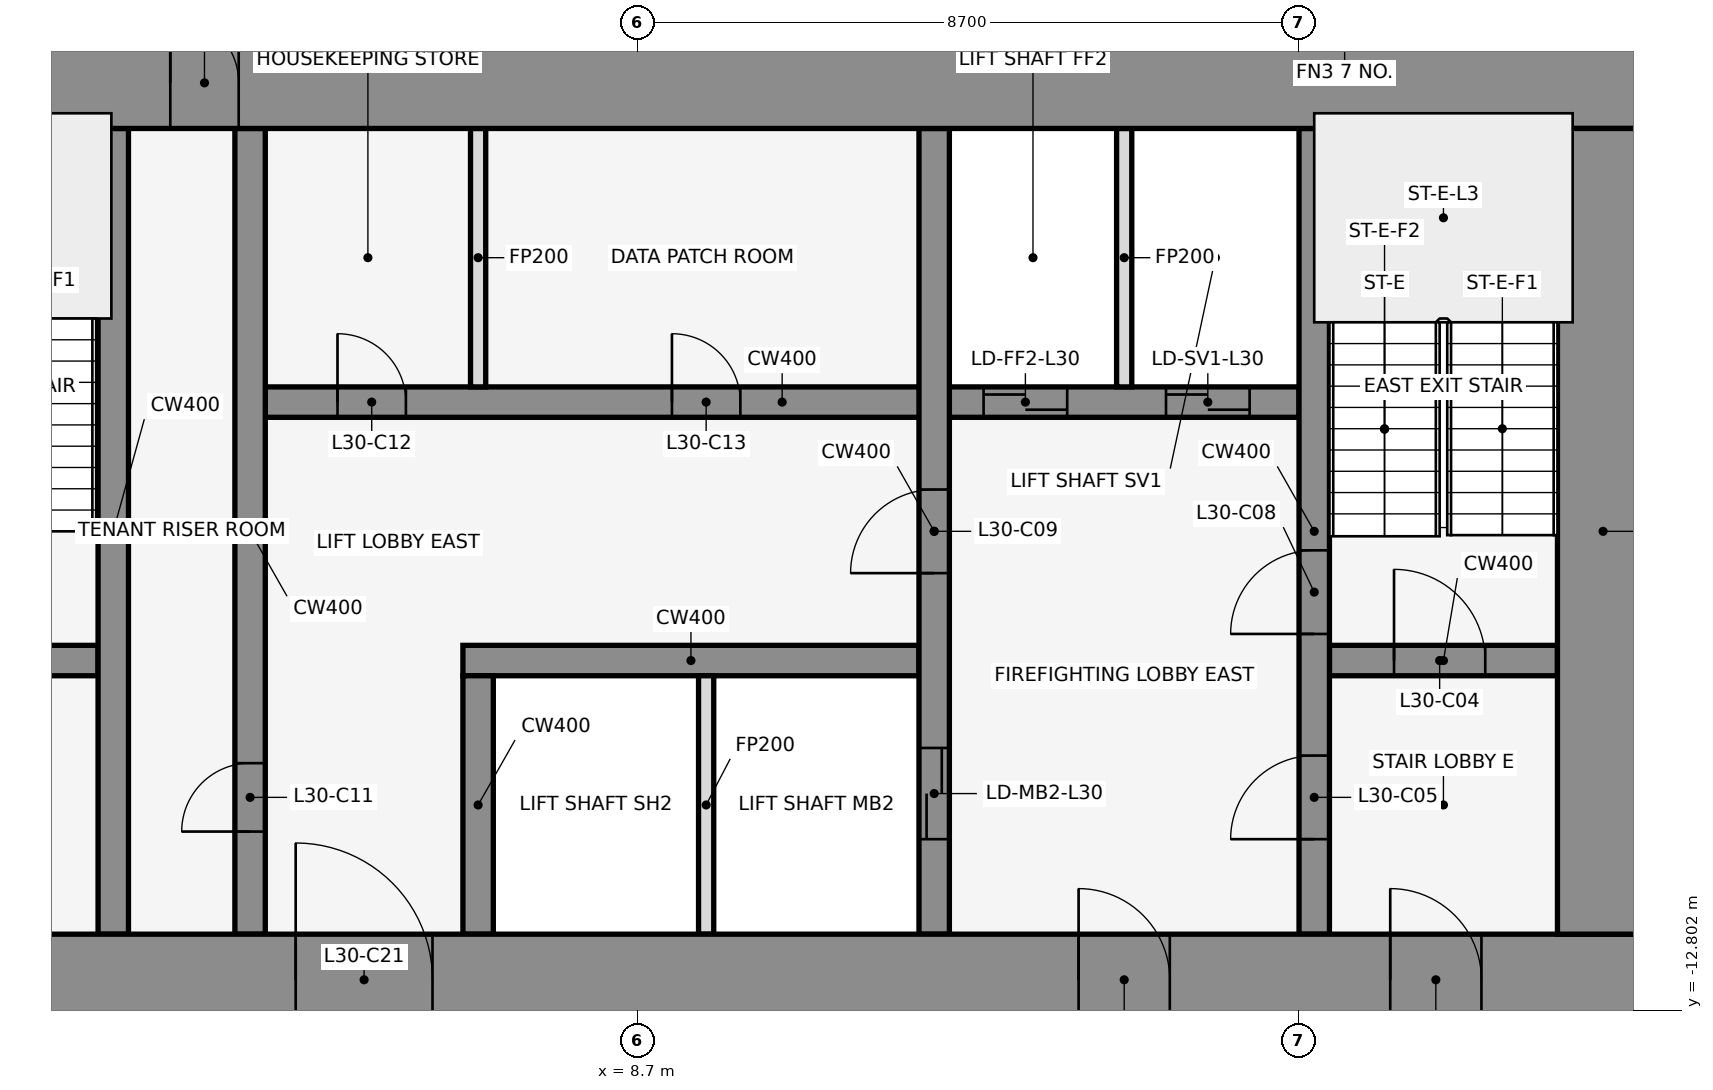
"""IFC4 building model, lengths in metres.
Left out: names, types, materials, properties, quantities, classifications, styles, units other than length and angle.
Written with IfcOpenShell. Run it as: python <this file> out.ifc"""

import sys

from ifc_helpers import new_model, si_unit, direction, frame, frame_2d, origin, place, context, subcontext, project, spatial, rectangle, extrude, element, fill, save


model = new_model("IFC4")
c1 = context("Model", 3, precision=1e-05, world=origin(), true_north=direction((0.0, 1.0)))
c2 = subcontext(c1, "Body", "Model", "MODEL_VIEW")
j1 = project(units=[si_unit("LENGTHUNIT", "METRE"), si_unit("PLANEANGLEUNIT", "RADIAN")], contexts=[c1])
p1 = place(None, origin())
s1 = spatial("IfcSite", under=j1, at=p1, CompositionType="ELEMENT")
p2 = place(p1, origin())
s2 = spatial("IfcBuilding", under=s1, at=p2, CompositionType="ELEMENT")
p3 = place(p2, frame((0.0, 0.0, 140.4)))
s3 = spatial("IfcBuildingStorey", under=s2, at=p3, CompositionType="ELEMENT", Elevation=140.4)
for number, where, z_axis, x_axis in (
    (1, (16.432, -0.105, 0.0), (0.0, 0.0, 1.0), (-0.84, 0.543, 0.0)),
    (2, (1.901, 1.08, 0.0), (0.0, 0.0, 1.0), (-0.84, -0.543, 0.0)),
):
    element("IfcWall", number, at=place(p3, frame(where, z_axis=z_axis, x_axis=x_axis)), inside=s3, PredefinedType="STANDARD", context=c2, shape_type="SweptSolid", body=[
        extrude(rectangle(XDim=2.183, YDim=0.25, at=frame_2d((1.091, 0.0))), origin(), (0.0, 0.0, 1.0), 3.95),
    ])
p4 = place(p3, frame((-1.6, -8.2, 0.0), z_axis=(0.0, 0.0, 1.0), x_axis=(1.0, 0.0, 0.0)))
e3 = element("IfcWall", 3, at=p4, inside=s3, PredefinedType="SHEAR", context=c2, shape_type="SweptSolid", body=[
    extrude(rectangle(XDim=3.2, YDim=0.4, at=frame_2d((1.6, 0.0))), origin(), (0.0, 0.0, 1.0), 4.1),
])
p5 = place(p4, frame((1.05, 0.0, 0.0)))
e4 = element("IfcOpeningElement", 4, at=p5, cuts=e3, PredefinedType="OPENING", context=c2, shape_type="SweptSolid", body=[
    extrude(rectangle(XDim=1.2, YDim=2.1, at=frame_2d((0.6, 1.05))), frame((0.0, 0.212, 0.0), z_axis=(0.0, -1.0, 0.0), x_axis=(1.0, 0.0, 0.0)), (0.0, 0.0, 1.0), 0.424),
])
p6 = place(p3, frame((6.4, -8.2, 0.0), z_axis=(0.0, 0.0, 1.0), x_axis=(1.0, 0.0, 0.0)))
e5 = element("IfcWall", 5, at=p6, inside=s3, PredefinedType="SHEAR", context=c2, shape_type="SweptSolid", body=[
    extrude(rectangle(XDim=6.0, YDim=0.4, at=frame_2d((3.0, 0.0))), origin(), (0.0, 0.0, 1.0), 4.1),
])
p7 = place(p3, frame((17.8, -8.2, 0.0), z_axis=(0.0, 0.0, 1.0), x_axis=(1.0, 0.0, 0.0)))
e6 = element("IfcWall", 6, at=p7, inside=s3, PredefinedType="SHEAR", context=c2, shape_type="SweptSolid", body=[
    extrude(rectangle(XDim=3.0, YDim=0.4, at=frame_2d((1.5, 0.0))), origin(), (0.0, 0.0, 1.0), 4.1),
])
p8 = place(p7, frame((0.85, 0.0, 0.0)))
e7 = element("IfcOpeningElement", 7, at=p8, cuts=e6, PredefinedType="OPENING", context=c2, shape_type="SweptSolid", body=[
    extrude(rectangle(XDim=1.2, YDim=2.1, at=frame_2d((0.6, 1.05))), frame((0.0, 0.212, 0.0), z_axis=(0.0, -1.0, 0.0), x_axis=(1.0, 0.0, 0.0)), (0.0, 0.0, 1.0), 0.424),
])
p9 = place(p3, frame((3.8, -4.8, 0.0), z_axis=(0.0, 0.0, 1.0), x_axis=(1.0, 0.0, 0.0)))
e8 = element("IfcWall", 8, at=p9, inside=s3, PredefinedType="SHEAR", context=c2, shape_type="SweptSolid", body=[
    extrude(rectangle(XDim=13.6, YDim=0.4, at=frame_2d((6.8, 0.0))), origin(), (0.0, 0.0, 1.0), 4.1),
])
p10 = place(p9, frame((9.45, 0.0, 0.0)))
e9 = element("IfcOpeningElement", 9, at=p10, cuts=e8, PredefinedType="OPENING", context=c2, shape_type="SweptSolid", body=[
    extrude(rectangle(XDim=1.1, YDim=2.1, at=frame_2d((0.55, 1.05))), frame((0.0, 0.212, 0.0), z_axis=(0.0, -1.0, 0.0), x_axis=(1.0, 0.0, 0.0)), (0.0, 0.0, 1.0), 0.424),
])
p11 = place(p9, frame((11.85, 0.0, 0.0)))
e10 = element("IfcOpeningElement", 10, at=p11, cuts=e8, PredefinedType="OPENING", context=c2, shape_type="SweptSolid", body=[
    extrude(rectangle(XDim=1.1, YDim=2.1, at=frame_2d((0.55, 1.05))), frame((0.0, 0.212, 0.0), z_axis=(0.0, -1.0, 0.0), x_axis=(1.0, 0.0, 0.0)), (0.0, 0.0, 1.0), 0.424),
])
p12 = place(p9, frame((0.95, 0.0, 0.0)))
e11 = element("IfcOpeningElement", 11, at=p12, cuts=e8, PredefinedType="OPENING", context=c2, shape_type="SweptSolid", body=[
    extrude(rectangle(XDim=0.9, YDim=2.1, at=frame_2d((0.45, 1.05))), frame((0.0, 0.212, 0.0), z_axis=(0.0, -1.0, 0.0), x_axis=(1.0, 0.0, 0.0)), (0.0, 0.0, 1.0), 0.424),
])
p13 = place(p9, frame((5.35, 0.0, 0.0)))
e12 = element("IfcOpeningElement", 12, at=p13, cuts=e8, PredefinedType="OPENING", context=c2, shape_type="SweptSolid", body=[
    extrude(rectangle(XDim=0.9, YDim=2.1, at=frame_2d((0.45, 1.05))), frame((0.0, 0.212, 0.0), z_axis=(0.0, -1.0, 0.0), x_axis=(1.0, 0.0, 0.0)), (0.0, 0.0, 1.0), 0.424),
])
p14 = place(p3, frame((1.8, -11.8, 0.0), z_axis=(0.0, 0.0, 1.0), x_axis=(0.0, 1.0, 0.0)))
e13 = element("IfcWall", 13, at=p14, inside=s3, PredefinedType="SHEAR", context=c2, shape_type="SweptSolid", body=[
    extrude(rectangle(XDim=10.6, YDim=0.4, at=frame_2d((5.3, 0.0))), origin(), (0.0, 0.0, 1.0), 4.1),
])
p15 = place(p3, frame((3.6, -11.8, 0.0), z_axis=(0.0, 0.0, 1.0), x_axis=(0.0, 1.0, 0.0)))
e14 = element("IfcWall", 14, at=p15, inside=s3, PredefinedType="SHEAR", context=c2, shape_type="SweptSolid", body=[
    extrude(rectangle(XDim=10.6, YDim=0.4, at=frame_2d((5.3, 0.0))), origin(), (0.0, 0.0, 1.0), 4.1),
])
p16 = place(p15, frame((1.35, 0.0, 0.0)))
e15 = element("IfcOpeningElement", 15, at=p16, cuts=e14, PredefinedType="OPENING", context=c2, shape_type="SweptSolid", body=[
    extrude(rectangle(XDim=0.9, YDim=2.1, at=frame_2d((0.45, 1.05))), frame((0.0, 0.212, 0.0), z_axis=(0.0, -1.0, 0.0), x_axis=(1.0, 0.0, 0.0)), (0.0, 0.0, 1.0), 0.424),
])
p17 = place(p3, frame((6.6, -11.8, 0.0), z_axis=(0.0, 0.0, 1.0), x_axis=(0.0, 1.0, 0.0)))
e16 = element("IfcWall", 16, at=p17, inside=s3, PredefinedType="SHEAR", context=c2, shape_type="SweptSolid", body=[
    extrude(rectangle(XDim=3.4, YDim=0.4, at=frame_2d((1.7, 0.0))), origin(), (0.0, 0.0, 1.0), 4.1),
])
for number, where, z_axis, x_axis in (
    (17, (6.6, -4.6, 0.0), (0.0, 0.0, 1.0), (0.0, 1.0, 0.0)),
    (18, (9.6, -11.8, 0.0), (0.0, 0.0, 1.0), (0.0, 1.0, 0.0)),
):
    element("IfcWall", number, at=place(p3, frame(where, z_axis=z_axis, x_axis=x_axis)), inside=s3, PredefinedType="PARTITIONING", context=c2, shape_type="SweptSolid", body=[
        extrude(rectangle(XDim=3.4, YDim=0.2, at=frame_2d((1.7, 0.0))), origin(), (0.0, 0.0, 1.0), 2.939),
    ])
p18 = place(p3, frame((12.6, -11.8, 0.0), z_axis=(0.0, 0.0, 1.0), x_axis=(0.0, 1.0, 0.0)))
e19 = element("IfcWall", 19, at=p18, inside=s3, PredefinedType="SHEAR", context=c2, shape_type="SweptSolid", body=[
    extrude(rectangle(XDim=10.6, YDim=0.4, at=frame_2d((5.3, 0.0))), origin(), (0.0, 0.0, 1.0), 4.1),
])
p19 = place(p18, frame((1.25, 0.0, 0.0)))
e20 = element("IfcOpeningElement", 20, at=p19, cuts=e19, PredefinedType="OPENING", context=c2, shape_type="SweptSolid", body=[
    extrude(rectangle(XDim=1.2, YDim=2.1, at=frame_2d((0.6, 1.05))), frame((0.0, 0.212, 0.0), z_axis=(0.0, -1.0, 0.0), x_axis=(1.0, 0.0, 0.0)), (0.0, 0.0, 1.0), 0.424),
])
p20 = place(p18, frame((4.75, 0.0, 0.0)))
e21 = element("IfcOpeningElement", 21, at=p20, cuts=e19, PredefinedType="OPENING", context=c2, shape_type="SweptSolid", body=[
    extrude(rectangle(XDim=1.1, YDim=2.1, at=frame_2d((0.55, 1.05))), frame((0.0, 0.212, 0.0), z_axis=(0.0, -1.0, 0.0), x_axis=(1.0, 0.0, 0.0)), (0.0, 0.0, 1.0), 0.424),
])
p21 = place(p3, frame((15.1, -4.6, 0.0), z_axis=(0.0, 0.0, 1.0), x_axis=(0.0, 1.0, 0.0)))
e22 = element("IfcWall", 22, at=p21, inside=s3, PredefinedType="PARTITIONING", context=c2, shape_type="SweptSolid", body=[
    extrude(rectangle(XDim=3.4, YDim=0.2, at=frame_2d((1.7, 0.0))), origin(), (0.0, 0.0, 1.0), 2.939),
])
p22 = place(p3, frame((17.6, -11.8, 0.0), z_axis=(0.0, 0.0, 1.0), x_axis=(0.0, 1.0, 0.0)))
e23 = element("IfcWall", 23, at=p22, inside=s3, PredefinedType="SHEAR", context=c2, shape_type="SweptSolid", body=[
    extrude(rectangle(XDim=10.6, YDim=0.4, at=frame_2d((5.3, 0.0))), origin(), (0.0, 0.0, 1.0), 4.1),
])
p23 = place(p22, frame((1.25, 0.0, 0.0)))
e24 = element("IfcOpeningElement", 24, at=p23, cuts=e23, PredefinedType="OPENING", context=c2, shape_type="SweptSolid", body=[
    extrude(rectangle(XDim=1.1, YDim=2.1, at=frame_2d((0.55, 1.05))), frame((0.0, 0.212, 0.0), z_axis=(0.0, -1.0, 0.0), x_axis=(1.0, 0.0, 0.0)), (0.0, 0.0, 1.0), 0.424),
])
p24 = place(p22, frame((3.95, 0.0, 0.0)))
e25 = element("IfcOpeningElement", 25, at=p24, cuts=e23, PredefinedType="OPENING", context=c2, shape_type="SweptSolid", body=[
    extrude(rectangle(XDim=1.1, YDim=2.1, at=frame_2d((0.55, 1.05))), frame((0.0, 0.212, 0.0), z_axis=(0.0, -1.0, 0.0), x_axis=(1.0, 0.0, 0.0)), (0.0, 0.0, 1.0), 0.424),
])
p25 = place(p3, frame((-22.0, -0.6, 0.0), z_axis=(0.0, 0.0, 1.0), x_axis=(1.0, 0.0, 0.0)))
e26 = element("IfcWall", 26, at=p25, inside=s3, PredefinedType="SHEAR", context=c2, shape_type="SweptSolid", body=[
    extrude(rectangle(XDim=44.0, YDim=1.2, at=frame_2d((22.0, 0.0))), origin(), (0.0, 0.0, 1.0), 4.1),
])
p26 = place(p25, frame((18.55, 0.0, 0.0)))
e27 = element("IfcOpeningElement", 27, at=p26, cuts=e26, PredefinedType="OPENING", context=c2, shape_type="SweptSolid", body=[
    extrude(rectangle(XDim=0.9, YDim=2.1, at=frame_2d((0.45, 1.05))), frame((0.0, 0.612, 0.0), z_axis=(0.0, -1.0, 0.0), x_axis=(1.0, 0.0, 0.0)), (0.0, 0.0, 1.0), 1.224),
])
p27 = place(p25, frame((24.55, 0.0, 0.0)))
e28 = element("IfcOpeningElement", 28, at=p27, cuts=e26, PredefinedType="OPENING", context=c2, shape_type="SweptSolid", body=[
    extrude(rectangle(XDim=0.9, YDim=2.1, at=frame_2d((0.45, 1.05))), frame((0.0, 0.612, 0.0), z_axis=(0.0, -1.0, 0.0), x_axis=(1.0, 0.0, 0.0)), (0.0, 0.0, 1.0), 1.224),
])
p28 = place(p3, frame((-22.0, -12.4, 0.0), z_axis=(0.0, 0.0, 1.0), x_axis=(1.0, 0.0, 0.0)))
e29 = element("IfcWall", 29, at=p28, inside=s3, PredefinedType="SHEAR", context=c2, shape_type="SweptSolid", body=[
    extrude(rectangle(XDim=44.0, YDim=1.2, at=frame_2d((22.0, 0.0))), origin(), (0.0, 0.0, 1.0), 4.1),
])
p29 = place(p28, frame((2.2, 0.0, 0.0)))
e30 = element("IfcOpeningElement", 30, at=p29, cuts=e29, PredefinedType="OPENING", context=c2, shape_type="SweptSolid", body=[
    extrude(rectangle(XDim=1.2, YDim=2.1, at=frame_2d((0.6, 1.05))), frame((0.0, 0.612, 0.0), z_axis=(0.0, -1.0, 0.0), x_axis=(1.0, 0.0, 0.0)), (0.0, 0.0, 1.0), 1.224),
])
p30 = place(p28, frame((21.4, 0.0, 0.0)))
e31 = element("IfcOpeningElement", 31, at=p30, cuts=e29, PredefinedType="OPENING", context=c2, shape_type="SweptSolid", body=[
    extrude(rectangle(XDim=1.2, YDim=2.1, at=frame_2d((0.6, 1.05))), frame((0.0, 0.612, 0.0), z_axis=(0.0, -1.0, 0.0), x_axis=(1.0, 0.0, 0.0)), (0.0, 0.0, 1.0), 1.224),
])
p31 = place(p28, frame((40.6, 0.0, 0.0)))
e32 = element("IfcOpeningElement", 32, at=p31, cuts=e29, PredefinedType="OPENING", context=c2, shape_type="SweptSolid", body=[
    extrude(rectangle(XDim=1.2, YDim=2.1, at=frame_2d((0.6, 1.05))), frame((0.0, 0.612, 0.0), z_axis=(0.0, -1.0, 0.0), x_axis=(1.0, 0.0, 0.0)), (0.0, 0.0, 1.0), 1.224),
])
p32 = place(p28, frame((16.0, 0.0, 0.0)))
e33 = element("IfcOpeningElement", 33, at=p32, cuts=e29, PredefinedType="OPENING", context=c2, shape_type="SweptSolid", body=[
    extrude(rectangle(XDim=1.8, YDim=2.1, at=frame_2d((0.9, 1.05))), frame((0.0, 0.612, 0.0), z_axis=(0.0, -1.0, 0.0), x_axis=(1.0, 0.0, 0.0)), (0.0, 0.0, 1.0), 1.224),
])
p33 = place(p28, frame((6.3, 0.0, 0.0)))
e34 = element("IfcOpeningElement", 34, at=p33, cuts=e29, PredefinedType="OPENING", context=c2, shape_type="SweptSolid", body=[
    extrude(rectangle(XDim=1.2, YDim=2.1, at=frame_2d((0.6, 1.05))), frame((0.0, 0.612, 0.0), z_axis=(0.0, -1.0, 0.0), x_axis=(1.0, 0.0, 0.0)), (0.0, 0.0, 1.0), 1.224),
])
p34 = place(p28, frame((26.2, 0.0, 0.0)))
e35 = element("IfcOpeningElement", 35, at=p34, cuts=e29, PredefinedType="OPENING", context=c2, shape_type="SweptSolid", body=[
    extrude(rectangle(XDim=1.8, YDim=2.1, at=frame_2d((0.9, 1.05))), frame((0.0, 0.612, 0.0), z_axis=(0.0, -1.0, 0.0), x_axis=(1.0, 0.0, 0.0)), (0.0, 0.0, 1.0), 1.224),
])
p35 = place(p28, frame((36.5, 0.0, 0.0)))
e36 = element("IfcOpeningElement", 36, at=p35, cuts=e29, PredefinedType="OPENING", context=c2, shape_type="SweptSolid", body=[
    extrude(rectangle(XDim=1.2, YDim=2.1, at=frame_2d((0.6, 1.05))), frame((0.0, 0.612, 0.0), z_axis=(0.0, -1.0, 0.0), x_axis=(1.0, 0.0, 0.0)), (0.0, 0.0, 1.0), 1.224),
])
p36 = place(p3, frame((21.4, -11.8, 0.0), z_axis=(0.0, 0.0, 1.0), x_axis=(0.0, 1.0, 0.0)))
e37 = element("IfcWall", 37, at=p36, inside=s3, PredefinedType="SHEAR", context=c2, shape_type="SweptSolid", body=[
    extrude(rectangle(XDim=10.6, YDim=1.2, at=frame_2d((5.3, 0.0))), origin(), (0.0, 0.0, 1.0), 4.1),
])
p37 = place(p8, origin())
e38 = element("IfcDoor", 38, at=p37, inside=s3, OperationType="SINGLE_SWING_RIGHT", PredefinedType="DOOR", context=c2, shape_type="SweptSolid", body=[
    extrude(rectangle(XDim=1.2, YDim=2.1, at=frame_2d((0.6, 1.05))), frame((0.0, 0.025, 0.0), z_axis=(0.0, -1.0, 0.0), x_axis=(1.0, 0.0, 0.0)), (0.0, 0.0, 1.0), 0.05),
])
fill(e7, e38)
p38 = place(p23, origin())
e39 = element("IfcDoor", 39, at=p38, inside=s3, OperationType="SINGLE_SWING_LEFT", PredefinedType="DOOR", context=c2, shape_type="SweptSolid", body=[
    extrude(rectangle(XDim=1.1, YDim=2.1, at=frame_2d((0.55, 1.05))), frame((0.0, 0.025, 0.0), z_axis=(0.0, -1.0, 0.0), x_axis=(1.0, 0.0, 0.0)), (0.0, 0.0, 1.0), 0.05),
])
fill(e24, e39)
p39 = place(p19, origin())
e40 = element("IfcDoor", 40, at=p39, inside=s3, OperationType="DOUBLE_DOOR_SLIDING", PredefinedType="DOOR", context=c2, shape_type="SweptSolid", body=[
    extrude(rectangle(XDim=1.2, YDim=2.1, at=frame_2d((0.6, 1.05))), frame((0.0, 0.025, 0.0), z_axis=(0.0, -1.0, 0.0), x_axis=(1.0, 0.0, 0.0)), (0.0, 0.0, 1.0), 0.05),
])
fill(e20, e40)
p40 = place(p10, origin())
e41 = element("IfcDoor", 41, at=p40, inside=s3, OperationType="DOUBLE_DOOR_SLIDING", PredefinedType="DOOR", context=c2, shape_type="SweptSolid", body=[
    extrude(rectangle(XDim=1.1, YDim=2.1, at=frame_2d((0.55, 1.05))), frame((0.0, 0.025, 0.0), z_axis=(0.0, -1.0, 0.0), x_axis=(1.0, 0.0, 0.0)), (0.0, 0.0, 1.0), 0.05),
])
fill(e9, e41)
p41 = place(p11, origin())
e42 = element("IfcDoor", 42, at=p41, inside=s3, OperationType="DOUBLE_DOOR_SLIDING", PredefinedType="DOOR", context=c2, shape_type="SweptSolid", body=[
    extrude(rectangle(XDim=1.1, YDim=2.1, at=frame_2d((0.55, 1.05))), frame((0.0, 0.025, 0.0), z_axis=(0.0, -1.0, 0.0), x_axis=(1.0, 0.0, 0.0)), (0.0, 0.0, 1.0), 0.05),
])
fill(e10, e42)
p42 = place(p24, origin())
e43 = element("IfcDoor", 43, at=p42, inside=s3, OperationType="SINGLE_SWING_RIGHT", PredefinedType="DOOR", context=c2, shape_type="SweptSolid", body=[
    extrude(rectangle(XDim=1.1, YDim=2.1, at=frame_2d((0.55, 1.05))), frame((0.0, 0.025, 0.0), z_axis=(0.0, -1.0, 0.0), x_axis=(1.0, 0.0, 0.0)), (0.0, 0.0, 1.0), 0.05),
])
fill(e25, e43)
p43 = place(p20, frame((1.1, 0.0, 0.0), z_axis=(0.0, 0.0, 1.0), x_axis=(-1.0, 0.0, 0.0)))
e44 = element("IfcDoor", 44, at=p43, inside=s3, OperationType="SINGLE_SWING_RIGHT", PredefinedType="DOOR", context=c2, shape_type="SweptSolid", body=[
    extrude(rectangle(XDim=1.1, YDim=2.1, at=frame_2d((0.55, 1.05))), frame((0.0, 0.025, 0.0), z_axis=(0.0, -1.0, 0.0), x_axis=(1.0, 0.0, 0.0)), (0.0, 0.0, 1.0), 0.05),
])
fill(e21, e44)
p44 = place(p16, origin())
e45 = element("IfcDoor", 45, at=p44, inside=s3, OperationType="SINGLE_SWING_LEFT", PredefinedType="DOOR", context=c2, shape_type="SweptSolid", body=[
    extrude(rectangle(XDim=0.9, YDim=2.1, at=frame_2d((0.45, 1.05))), frame((0.0, 0.025, 0.0), z_axis=(0.0, -1.0, 0.0), x_axis=(1.0, 0.0, 0.0)), (0.0, 0.0, 1.0), 0.05),
])
fill(e15, e45)
p45 = place(p12, origin())
e46 = element("IfcDoor", 46, at=p45, inside=s3, OperationType="SINGLE_SWING_RIGHT", PredefinedType="DOOR", context=c2, shape_type="SweptSolid", body=[
    extrude(rectangle(XDim=0.9, YDim=2.1, at=frame_2d((0.45, 1.05))), frame((0.0, 0.025, 0.0), z_axis=(0.0, -1.0, 0.0), x_axis=(1.0, 0.0, 0.0)), (0.0, 0.0, 1.0), 0.05),
])
fill(e11, e46)
p46 = place(p13, origin())
e47 = element("IfcDoor", 47, at=p46, inside=s3, OperationType="SINGLE_SWING_LEFT", PredefinedType="DOOR", context=c2, shape_type="SweptSolid", body=[
    extrude(rectangle(XDim=0.9, YDim=2.1, at=frame_2d((0.45, 1.05))), frame((0.0, 0.025, 0.0), z_axis=(0.0, -1.0, 0.0), x_axis=(1.0, 0.0, 0.0)), (0.0, 0.0, 1.0), 0.05),
])
fill(e12, e47)
p47 = place(p27, origin())
e48 = element("IfcDoor", 48, at=p47, inside=s3, OperationType="SINGLE_SWING_LEFT", PredefinedType="DOOR", context=c2, shape_type="SweptSolid", body=[
    extrude(rectangle(XDim=0.9, YDim=2.1, at=frame_2d((0.45, 1.05))), frame((0.0, 0.025, 0.0), z_axis=(0.0, -1.0, 0.0), x_axis=(1.0, 0.0, 0.0)), (0.0, 0.0, 1.0), 0.05),
])
fill(e28, e48)
p48 = place(p31, frame((1.2, 0.0, 0.0), z_axis=(0.0, 0.0, 1.0), x_axis=(-1.0, 0.0, 0.0)))
e49 = element("IfcDoor", 49, at=p48, inside=s3, OperationType="SINGLE_SWING_RIGHT", PredefinedType="DOOR", context=c2, shape_type="SweptSolid", body=[
    extrude(rectangle(XDim=1.2, YDim=2.1, at=frame_2d((0.6, 1.05))), frame((0.0, 0.025, 0.0), z_axis=(0.0, -1.0, 0.0), x_axis=(1.0, 0.0, 0.0)), (0.0, 0.0, 1.0), 0.05),
])
fill(e32, e49)
p49 = place(p34, origin())
e50 = element("IfcDoor", 50, at=p49, inside=s3, OperationType="SINGLE_SWING_LEFT", PredefinedType="DOOR", context=c2, shape_type="SweptSolid", body=[
    extrude(rectangle(XDim=1.8, YDim=2.1, at=frame_2d((0.9, 1.05))), frame((0.0, 0.025, 0.0), z_axis=(0.0, -1.0, 0.0), x_axis=(1.0, 0.0, 0.0)), (0.0, 0.0, 1.0), 0.05),
])
fill(e35, e50)
p50 = place(p35, frame((1.2, 0.0, 0.0), z_axis=(0.0, 0.0, 1.0), x_axis=(-1.0, 0.0, 0.0)))
e51 = element("IfcDoor", 51, at=p50, inside=s3, OperationType="SINGLE_SWING_RIGHT", PredefinedType="DOOR", context=c2, shape_type="SweptSolid", body=[
    extrude(rectangle(XDim=1.2, YDim=2.1, at=frame_2d((0.6, 1.05))), frame((0.0, 0.025, 0.0), z_axis=(0.0, -1.0, 0.0), x_axis=(1.0, 0.0, 0.0)), (0.0, 0.0, 1.0), 0.05),
])
fill(e36, e51)
save(model, sys.argv[1])
